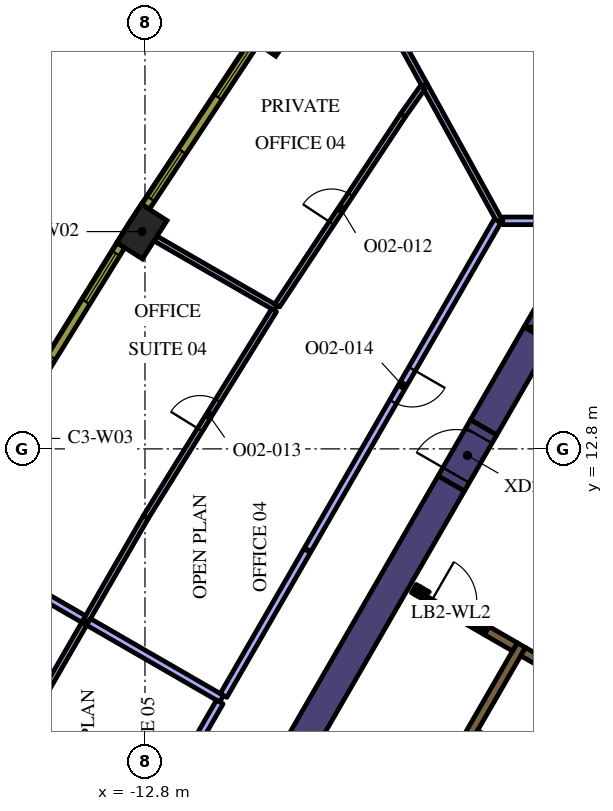
"""IFC4 building model, lengths in metres.
Left out: names, types, materials, properties, quantities, classifications, styles, units other than length and angle.
Written with IfcOpenShell. Run it as: python <this file> out.ifc"""

import sys

from ifc_helpers import new_model, si_unit, direction, frame, frame_2d, origin, origin_2d, place, context, subcontext, project, spatial, polyline, rectangle, outline, extrude, element, fill, save


model = new_model("IFC4")
c1 = context("Model", 3, precision=1e-05, world=origin(), true_north=direction((0.0, 1.0)))
c2 = subcontext(c1, "Body", "Model", "MODEL_VIEW")
j1 = project(units=[si_unit("LENGTHUNIT", "METRE"), si_unit("PLANEANGLEUNIT", "RADIAN")], contexts=[c1])
p1 = place(None, origin())
s1 = spatial("IfcSite", under=j1, at=p1, CompositionType="ELEMENT")
p2 = place(p1, origin())
s2 = spatial("IfcBuilding", under=s1, at=p2, CompositionType="ELEMENT")
p3 = place(p2, frame((0.0, 0.0, 158.4)))
s3 = spatial("IfcBuildingStorey", under=s2, at=p3, CompositionType="ELEMENT", Elevation=158.4)
for number, where, z_axis, x_axis in (
    (1, (-9.348, 23.854, 0.0), (0.0, 0.0, 1.0), (-0.565, -0.825, 0.0)),
    (2, (-12.88, 18.517, 0.0), (0.0, 0.0, 1.0), (-0.539, -0.842, 0.0)),
):
    element("IfcColumn", number, at=place(p3, frame(where, z_axis=z_axis, x_axis=x_axis)), inside=s3, PredefinedType="COLUMN", context=c2, shape_type="SweptSolid", body=[
        extrude(rectangle(XDim=1.2, YDim=0.8, at=origin_2d()), origin(), (0.0, 0.0, 1.0), 4.2),
    ])
p4 = place(p3, origin())
e3 = element("IfcWall", 3, at=p4, inside=s3, PredefinedType="SOLIDWALL", context=c2, shape_type="SweptSolid", body=[
    extrude(outline(polyline([(-2.829, 16.0), (-2.381, 16.776), (-2.381, 16.0), (-2.829, 16.0)])), origin(), (0.0, 0.0, 1.0), 4.2),
])
p5 = place(p3, frame((-2.477, 15.81, 0.0), z_axis=(0.0, 0.0, 1.0), x_axis=(-0.499969377405, -0.866043083026, 0.0)))
e4 = element("IfcWall", 4, at=p5, inside=s3, PredefinedType="SOLIDWALL", context=c2, shape_type="SweptSolid", body=[
    extrude(rectangle(XDim=2.824, YDim=0.8, at=frame_2d((1.412, 0.0))), origin(), (0.0, 0.0, 1.0), 4.2),
])
e5 = element("IfcWall", 5, at=p4, inside=s3, PredefinedType="SOLIDWALL", context=c2, shape_type="SweptSolid", body=[
    extrude(outline(polyline([(-1.905, 16.0), (-2.129, 15.612), (-2.801, 16.0), (-1.905, 16.0)])), origin(), (0.0, 0.0, 1.0), 4.2),
])
p6 = place(p3, frame((-12.668, -1.842, 0.0), z_axis=(0.0, 0.0, 1.0), x_axis=(0.500003640647, 0.866023301845, 0.0)))
e6 = element("IfcWall", 6, at=p6, inside=s3, PredefinedType="SOLIDWALL", context=c2, shape_type="SweptSolid", body=[
    extrude(rectangle(XDim=15.858, YDim=0.8, at=frame_2d((7.929, 0.0))), origin(), (0.0, 0.0, 1.0), 4.2),
])
p7 = place(p3, frame((-8.06, -1.311, 0.0), z_axis=(0.0, 0.0, 1.0), x_axis=(0.50000273126, 0.866023826885, 0.0)))
e7 = element("IfcWall", 7, at=p7, inside=s3, PredefinedType="SOLIDWALL", context=c2, shape_type="SweptSolid", body=[
    extrude(rectangle(XDim=10.33, YDim=0.25, at=frame_2d((5.165, 0.0))), origin(), (0.0, 0.0, 1.0), 4.2),
])
p8 = place(p3, frame((-1.76, 6.836, 0.0), z_axis=(0.0, 0.0, 1.0), x_axis=(-0.865952863304, 0.500125622755, 0.0)))
e8 = element("IfcWall", 8, at=p8, inside=s3, PredefinedType="SOLIDWALL", context=c2, shape_type="SweptSolid", body=[
    extrude(rectangle(XDim=1.258, YDim=0.25, at=frame_2d((0.629, 0.0))), origin(), (0.0, 0.0, 1.0), 4.2),
])
p9 = place(p3, frame((-2.204, 4.182, 0.0), z_axis=(0.0, 0.0, 1.0), x_axis=(-0.866008176907, 0.50002983664, 0.0)))
e9 = element("IfcWall", 9, at=p9, inside=s3, PredefinedType="SOLIDWALL", context=c2, shape_type="SweptSolid", body=[
    extrude(rectangle(XDim=2.2, YDim=0.25, at=frame_2d((1.1, 0.0))), origin(), (0.0, 0.0, 1.0), 4.2),
])
p10 = place(p3, frame((-5.725, 9.125, 0.0), z_axis=(0.0, 0.0, 1.0), x_axis=(0.866185586049, -0.49972245349, 0.0)))
e10 = element("IfcWall", 10, at=p10, inside=s3, PredefinedType="SOLIDWALL", context=c2, shape_type="SweptSolid", body=[
    extrude(rectangle(XDim=0.11, YDim=0.25, at=frame_2d((0.055, 0.0))), origin(), (0.0, 0.0, 1.0), 4.2),
])
p11 = place(p3, frame((-3.066, 7.59, 0.0), z_axis=(0.0, 0.0, 1.0), x_axis=(-0.866081358704, 0.49990307071, 0.0)))
e11 = element("IfcWall", 11, at=p11, inside=s3, PredefinedType="SOLIDWALL", context=c2, shape_type="SweptSolid", body=[
    extrude(rectangle(XDim=0.858, YDim=0.25, at=frame_2d((0.429, 0.0))), origin(), (0.0, 0.0, 1.0), 4.2),
])
e12 = element("IfcWall", 12, at=p4, inside=s3, PredefinedType="SOLIDWALL", context=c2, shape_type="SweptSolid", body=[
    extrude(outline(polyline([(-3.748, 8.128), (-3.813, 8.015), (-4.027, 8.139), (-4.017, 8.156), (-4.008, 8.173), (-4.0, 8.192), (-3.995, 8.21), (-3.991, 8.23), (-3.99, 8.25), (-3.99, 8.268), (-3.748, 8.128)])), origin(), (0.0, 0.0, 1.0), 4.2),
])
e13 = element("IfcWall", 13, at=p4, inside=s3, PredefinedType="SOLIDWALL", context=c2, shape_type="SweptSolid", body=[
    extrude(outline(polyline([(-5.689, 8.96), (-5.69, 8.961), (-5.565, 9.177), (-5.319, 9.035), (-5.335, 9.026), (-5.351, 9.015), (-5.366, 9.002), (-5.379, 8.988), (-5.392, 8.972), (-5.402, 8.956), (-5.412, 8.939), (-5.629, 9.064), (-5.629, 9.064), (-5.689, 8.96)])), origin(), (0.0, 0.0, 1.0), 4.2),
])
p12 = place(p3, frame((-0.898, 6.194, 0.0), z_axis=(0.0, 0.0, 1.0), x_axis=(-0.499996202215, -0.866027596426, 0.0)))
e14 = element("IfcWall", 14, at=p12, inside=s3, PredefinedType="SOLIDWALL", context=c2, shape_type="SweptSolid", body=[
    extrude(rectangle(XDim=9.83, YDim=0.25, at=frame_2d((4.915, 0.0))), origin(), (0.0, 0.0, 1.0), 4.2),
])
p13 = place(p12, frame((0.585, 0.0, 0.0)))
e15 = element("IfcOpeningElement", 15, at=p13, cuts=e14, PredefinedType="OPENING", context=c2, shape_type="SweptSolid", body=[
    extrude(rectangle(XDim=1.1, YDim=2.1, at=frame_2d((0.55, 1.05))), frame((0.0, 0.135, 0.0), z_axis=(0.0, -1.0, 0.0), x_axis=(1.0, 0.0, 0.0)), (0.0, 0.0, 1.0), 0.27),
])
p14 = place(p12, frame((3.105, 0.0, 0.0)))
e16 = element("IfcOpeningElement", 16, at=p14, cuts=e14, PredefinedType="OPENING", context=c2, shape_type="SweptSolid", body=[
    extrude(rectangle(XDim=1.1, YDim=2.1, at=frame_2d((0.55, 1.05))), frame((0.0, 0.135, 0.0), z_axis=(0.0, -1.0, 0.0), x_axis=(1.0, 0.0, 0.0)), (0.0, 0.0, 1.0), 0.27),
])
p15 = place(p12, frame((5.625, 0.0, 0.0)))
e17 = element("IfcOpeningElement", 17, at=p15, cuts=e14, PredefinedType="OPENING", context=c2, shape_type="SweptSolid", body=[
    extrude(rectangle(XDim=1.1, YDim=2.1, at=frame_2d((0.55, 1.05))), frame((0.0, 0.135, 0.0), z_axis=(0.0, -1.0, 0.0), x_axis=(1.0, 0.0, 0.0)), (0.0, 0.0, 1.0), 0.27),
])
p16 = place(p12, frame((8.145, 0.0, 0.0)))
e18 = element("IfcOpeningElement", 18, at=p16, cuts=e14, PredefinedType="OPENING", context=c2, shape_type="SweptSolid", body=[
    extrude(rectangle(XDim=1.1, YDim=2.1, at=frame_2d((0.55, 1.05))), frame((0.0, 0.135, 0.0), z_axis=(0.0, -1.0, 0.0), x_axis=(1.0, 0.0, 0.0)), (0.0, 0.0, 1.0), 0.27),
])
p17 = place(p3, frame((-5.659, 9.012, 0.0), z_axis=(0.0, 0.0, 1.0), x_axis=(0.866009402589, -0.500027713859, 0.0)))
e19 = element("IfcWall", 19, at=p17, inside=s3, PredefinedType="PARTITIONING", context=c2, shape_type="SweptSolid", body=[
    extrude(rectangle(XDim=2.1, YDim=0.12, at=frame_2d((1.05, 0.0))), origin(), (0.0, 0.0, 1.0), 3.15),
])
p18 = place(p17, frame((0.45, 0.0, 0.0)))
e20 = element("IfcOpeningElement", 20, at=p18, cuts=e19, PredefinedType="OPENING", context=c2, shape_type="SweptSolid", body=[
    extrude(rectangle(XDim=1.2, YDim=2.1, at=frame_2d((0.6, 1.05))), frame((0.0, 0.07, 0.0), z_axis=(0.0, -1.0, 0.0), x_axis=(1.0, 0.0, 0.0)), (0.0, 0.0, 1.0), 0.14),
])
p19 = place(p3, frame((-4.739, 11.892, 0.0), z_axis=(0.0, 0.0, 1.0), x_axis=(0.500062241894, 0.865989465428, 0.0)))
e21 = element("IfcWall", 21, at=p19, inside=s3, PredefinedType="SOLIDWALL", context=c2, shape_type="SweptSolid", body=[
    extrude(rectangle(XDim=1.7, YDim=0.8, at=frame_2d((0.85, 0.0))), origin(), (0.0, 0.0, 1.0), 4.2),
])
p20 = place(p19, frame((0.25, 0.0, 0.0)))
e22 = element("IfcOpeningElement", 22, at=p20, cuts=e21, PredefinedType="OPENING", context=c2, shape_type="SweptSolid", body=[
    extrude(rectangle(XDim=1.2, YDim=2.1, at=frame_2d((0.6, 1.05))), frame((0.0, 0.41, 0.0), z_axis=(0.0, -1.0, 0.0), x_axis=(1.0, 0.0, 0.0)), (0.0, 0.0, 1.0), 0.82),
])
p21 = place(p3, frame((-5.442, 22.374, 0.0), z_axis=(0.0, 0.0, 1.0), x_axis=(-0.482987550425, 0.875627218703, 0.0)))
e23 = element("IfcWall", 23, at=p21, inside=s3, PredefinedType="PARTITIONING", context=c2, shape_type="SweptSolid", body=[
    extrude(rectangle(XDim=4.672, YDim=0.15, at=frame_2d((2.336, 0.0))), origin(), (0.0, 0.0, 1.0), 3.15),
])
p22 = place(p3, frame((-3.47, 18.8, 0.0), z_axis=(0.0, 0.0, 1.0), x_axis=(-0.482974768035, 0.875634269225, 0.0)))
e24 = element("IfcWall", 24, at=p22, inside=s3, PredefinedType="PARTITIONING", context=c2, shape_type="SweptSolid", body=[
    extrude(rectangle(XDim=4.09, YDim=0.15, at=frame_2d((2.045, 0.0))), origin(), (0.0, 0.0, 1.0), 3.15),
])
p23 = place(p3, frame((-1.23, 18.8, 0.0), z_axis=(0.0, 0.0, 1.0), x_axis=(-1.0, 0.0, 0.0)))
e25 = element("IfcWall", 25, at=p23, inside=s3, PredefinedType="PARTITIONING", context=c2, shape_type="SweptSolid", body=[
    extrude(rectangle(XDim=2.155, YDim=0.2, at=frame_2d((1.077, 0.0))), origin(), (0.0, 0.0, 1.0), 3.15),
])
p24 = place(p3, frame((-9.363, 16.511, 0.0), z_axis=(0.0, 0.0, 1.0), x_axis=(-0.866006134298, 0.500033374244, 0.0)))
e26 = element("IfcWall", 26, at=p24, inside=s3, PredefinedType="PARTITIONING", context=c2, shape_type="SweptSolid", body=[
    extrude(rectangle(XDim=3.648, YDim=0.15, at=frame_2d((1.824, 0.0))), origin(), (0.0, 0.0, 1.0), 3.15),
])
p25 = place(p3, frame((-5.492, 22.31, 0.0), z_axis=(0.0, 0.0, 1.0), x_axis=(-0.576980663571, -0.816757806124, 0.0)))
e27 = element("IfcWall", 27, at=p25, inside=s3, PredefinedType="PARTITIONING", context=c2, shape_type="SweptSolid", body=[
    extrude(rectangle(XDim=0.902, YDim=0.15, at=frame_2d((0.451, 0.0))), origin(), (0.0, 0.0, 1.0), 3.15),
])
p26 = place(p3, frame((-9.322, 16.573, 0.0), z_axis=(0.0, 0.0, 1.0), x_axis=(0.551906048292, 0.833906298009, 0.0)))
e28 = element("IfcWall", 28, at=p26, inside=s3, PredefinedType="PARTITIONING", context=c2, shape_type="SweptSolid", body=[
    extrude(rectangle(XDim=5.995, YDim=0.15, at=frame_2d((2.998, 0.0))), origin(), (0.0, 0.0, 1.0), 3.15),
])
p27 = place(p26, frame((2.595, 0.0, 0.0)))
e29 = element("IfcOpeningElement", 29, at=p27, cuts=e28, PredefinedType="OPENING", context=c2, shape_type="SweptSolid", body=[
    extrude(rectangle(XDim=0.9, YDim=2.1, at=frame_2d((0.45, 1.05))), frame((0.0, 0.085, 0.0), z_axis=(0.0, -1.0, 0.0), x_axis=(1.0, 0.0, 0.0)), (0.0, 0.0, 1.0), 0.17),
])
p28 = place(p3, frame((-12.779, 11.002, 0.0), z_axis=(0.0, 0.0, 1.0), x_axis=(0.527026092571, 0.849849102929, 0.0)))
e30 = element("IfcWall", 30, at=p28, inside=s3, PredefinedType="PARTITIONING", context=c2, shape_type="SweptSolid", body=[
    extrude(rectangle(XDim=6.407, YDim=0.15, at=frame_2d((3.204, 0.0))), origin(), (0.0, 0.0, 1.0), 3.15),
])
p29 = place(p28, frame((2.707, 0.0, 0.0)))
e31 = element("IfcOpeningElement", 31, at=p29, cuts=e30, PredefinedType="OPENING", context=c2, shape_type="SweptSolid", body=[
    extrude(rectangle(XDim=0.9, YDim=2.1, at=frame_2d((0.45, 1.05))), frame((0.0, 0.085, 0.0), z_axis=(0.0, -1.0, 0.0), x_axis=(1.0, 0.0, 0.0)), (0.0, 0.0, 1.0), 0.17),
])
p30 = place(p3, frame((-12.779, 11.002, 0.0), z_axis=(0.0, 0.0, 1.0), x_axis=(-0.499996312652, -0.866027532665, 0.0)))
e32 = element("IfcWall", 32, at=p30, inside=s3, PredefinedType="PARTITIONING", context=c2, shape_type="SweptSolid", body=[
    extrude(rectangle(XDim=3.138, YDim=0.15, at=frame_2d((1.569, 0.0))), origin(), (0.0, 0.0, 1.0), 3.15),
])
p31 = place(p3, frame((-14.413, 8.322, 0.0), z_axis=(0.0, 0.0, 1.0), x_axis=(-0.866034795751, 0.499983732284, 0.0)))
e33 = element("IfcWall", 33, at=p31, inside=s3, PredefinedType="PARTITIONING", context=c2, shape_type="SweptSolid", body=[
    extrude(rectangle(XDim=4.125, YDim=0.2, at=frame_2d((2.062, 0.0))), origin(), (0.0, 0.0, 1.0), 3.15),
])
p32 = place(p3, frame((-10.782, 6.225, 0.0), z_axis=(0.0, 0.0, 1.0), x_axis=(-0.866034752867, 0.499983806564, 0.0)))
e34 = element("IfcWall", 34, at=p32, inside=s3, PredefinedType="PARTITIONING", context=c2, shape_type="SweptSolid", body=[
    extrude(rectangle(XDim=4.043, YDim=0.2, at=frame_2d((2.021, 0.0))), origin(), (0.0, 0.0, 1.0), 3.15),
])
p33 = place(p3, frame((-8.532, 10.122, 0.0), z_axis=(0.0, 0.0, 1.0), x_axis=(-0.499988222896, -0.866032203192, 0.0)))
e35 = element("IfcWall", 35, at=p33, inside=s3, PredefinedType="PARTITIONING", context=c2, shape_type="SweptSolid", body=[
    extrude(rectangle(XDim=4.4, YDim=0.2, at=frame_2d((2.2, 0.0))), origin(), (0.0, 0.0, 1.0), 3.15),
])
p34 = place(p3, frame((-3.522, 18.8, 0.0), z_axis=(0.0, 0.0, 1.0), x_axis=(-0.500015783377, -0.866016291056, 0.0)))
e36 = element("IfcWall", 36, at=p34, inside=s3, PredefinedType="PARTITIONING", context=c2, shape_type="SweptSolid", body=[
    extrude(rectangle(XDim=9.99, YDim=0.2, at=frame_2d((4.995, 0.0))), origin(), (0.0, 0.0, 1.0), 3.15),
])
p35 = place(p34, frame((4.5, 0.0, 0.0)))
e37 = element("IfcOpeningElement", 37, at=p35, cuts=e36, PredefinedType="OPENING", context=c2, shape_type="SweptSolid", body=[
    extrude(rectangle(XDim=1.0, YDim=2.1, at=frame_2d((0.5, 1.05))), frame((0.0, 0.11, 0.0), z_axis=(0.0, -1.0, 0.0), x_axis=(1.0, 0.0, 0.0)), (0.0, 0.0, 1.0), 0.22),
])
p36 = place(p3, frame((-14.398, 8.198, 0.0), z_axis=(0.0, 0.0, 1.0), x_axis=(-0.499993740961, -0.866029017412, 0.0)))
e38 = element("IfcWall", 38, at=p36, inside=s3, PredefinedType="PARTITIONING", context=c2, shape_type="SweptSolid", body=[
    extrude(rectangle(XDim=3.038, YDim=0.15, at=frame_2d((1.519, 0.0))), origin(), (0.0, 0.0, 1.0), 3.15),
])
p37 = place(p3, frame((-10.832, 6.138, 0.0), z_axis=(0.0, 0.0, 1.0), x_axis=(-0.499988222896, -0.866032203192, 0.0)))
e39 = element("IfcWall", 39, at=p37, inside=s3, PredefinedType="PARTITIONING", context=c2, shape_type="SweptSolid", body=[
    extrude(rectangle(XDim=4.4, YDim=0.2, at=frame_2d((2.2, 0.0))), origin(), (0.0, 0.0, 1.0), 3.15),
])
p38 = place(p3, frame((-9.911, 23.51, 0.0), z_axis=(0.0, 0.0, 1.0), x_axis=(-0.551892811511, -0.833915058386, 0.0)))
e40 = element("IfcWall", 40, at=p38, inside=s3, PredefinedType="SOLIDWALL", context=c2, shape_type="SweptSolid", body=[
    extrude(rectangle(XDim=5.204, YDim=0.24, at=frame_2d((2.602, 0.0))), origin(), (0.0, 0.0, 1.0), 3.95),
])
p39 = place(p38, frame((0.248, 0.0, 0.9)))
e41 = element("IfcOpeningElement", 41, at=p39, cuts=e40, PredefinedType="OPENING", context=c2, shape_type="SweptSolid", body=[
    extrude(rectangle(XDim=1.5, YDim=2.55, at=frame_2d((0.75, 1.275))), frame((0.0, 0.13, 0.0), z_axis=(0.0, -1.0, 0.0), x_axis=(1.0, 0.0, 0.0)), (0.0, 0.0, 1.0), 0.26),
])
p40 = place(p38, frame((3.455, 0.0, 0.9)))
e42 = element("IfcOpeningElement", 42, at=p40, cuts=e40, PredefinedType="OPENING", context=c2, shape_type="SweptSolid", body=[
    extrude(rectangle(XDim=1.5, YDim=2.55, at=frame_2d((0.75, 1.275))), frame((0.0, 0.13, 0.0), z_axis=(0.0, -1.0, 0.0), x_axis=(1.0, 0.0, 0.0)), (0.0, 0.0, 1.0), 0.26),
])
p41 = place(p3, frame((-13.433, 18.156, 0.0), z_axis=(0.0, 0.0, 1.0), x_axis=(-0.526197926587, -0.850362124072, 0.0)))
e43 = element("IfcWall", 43, at=p41, inside=s3, PredefinedType="SOLIDWALL", context=c2, shape_type="SweptSolid", body=[
    extrude(rectangle(XDim=5.203, YDim=0.24, at=frame_2d((2.602, 0.0))), origin(), (0.0, 0.0, 1.0), 3.95),
])
p42 = place(p41, frame((0.248, 0.0, 0.9)))
e44 = element("IfcOpeningElement", 44, at=p42, cuts=e43, PredefinedType="OPENING", context=c2, shape_type="SweptSolid", body=[
    extrude(rectangle(XDim=1.5, YDim=2.55, at=frame_2d((0.75, 1.275))), frame((0.0, 0.13, 0.0), z_axis=(0.0, -1.0, 0.0), x_axis=(1.0, 0.0, 0.0)), (0.0, 0.0, 1.0), 0.26),
])
p43 = place(p41, frame((3.455, 0.0, 0.9)))
e45 = element("IfcOpeningElement", 45, at=p43, cuts=e43, PredefinedType="OPENING", context=c2, shape_type="SweptSolid", body=[
    extrude(rectangle(XDim=1.5, YDim=2.55, at=frame_2d((0.75, 1.275))), frame((0.0, 0.13, 0.0), z_axis=(0.0, -1.0, 0.0), x_axis=(1.0, 0.0, 0.0)), (0.0, 0.0, 1.0), 0.26),
])
p44 = place(p18, origin())
e46 = element("IfcDoor", 46, at=p44, inside=s3, OperationType="SINGLE_SWING_LEFT", PredefinedType="DOOR", context=c2, shape_type="SweptSolid", body=[
    extrude(rectangle(XDim=1.2, YDim=2.1, at=frame_2d((0.6, 1.05))), frame((0.0, 0.025, 0.0), z_axis=(0.0, -1.0, 0.0), x_axis=(1.0, 0.0, 0.0)), (0.0, 0.0, 1.0), 0.05),
])
fill(e20, e46)
p45 = place(p20, origin())
e47 = element("IfcDoor", 47, at=p45, inside=s3, OperationType="SINGLE_SWING_LEFT", PredefinedType="DOOR", context=c2, shape_type="SweptSolid", body=[
    extrude(rectangle(XDim=1.2, YDim=2.1, at=frame_2d((0.6, 1.05))), frame((0.0, 0.025, 0.0), z_axis=(0.0, -1.0, 0.0), x_axis=(1.0, 0.0, 0.0)), (0.0, 0.0, 1.0), 0.05),
])
fill(e22, e47)
p46 = place(p27, origin())
e48 = element("IfcDoor", 48, at=p46, inside=s3, OperationType="SINGLE_SWING_RIGHT", PredefinedType="DOOR", context=c2, shape_type="SweptSolid", body=[
    extrude(rectangle(XDim=0.9, YDim=2.1, at=frame_2d((0.45, 1.05))), frame((0.0, 0.025, 0.0), z_axis=(0.0, -1.0, 0.0), x_axis=(1.0, 0.0, 0.0)), (0.0, 0.0, 1.0), 0.05),
])
fill(e29, e48)
p47 = place(p29, origin())
e49 = element("IfcDoor", 49, at=p47, inside=s3, OperationType="SINGLE_SWING_LEFT", PredefinedType="DOOR", context=c2, shape_type="SweptSolid", body=[
    extrude(rectangle(XDim=0.9, YDim=2.1, at=frame_2d((0.45, 1.05))), frame((0.0, 0.025, 0.0), z_axis=(0.0, -1.0, 0.0), x_axis=(1.0, 0.0, 0.0)), (0.0, 0.0, 1.0), 0.05),
])
fill(e31, e49)
p48 = place(p35, origin())
e50 = element("IfcDoor", 50, at=p48, inside=s3, OperationType="SINGLE_SWING_RIGHT", PredefinedType="DOOR", context=c2, shape_type="SweptSolid", body=[
    extrude(rectangle(XDim=1.0, YDim=2.1, at=frame_2d((0.5, 1.05))), frame((0.0, 0.025, 0.0), z_axis=(0.0, -1.0, 0.0), x_axis=(1.0, 0.0, 0.0)), (0.0, 0.0, 1.0), 0.05),
])
fill(e37, e50)
p49 = place(p39, origin())
e51 = element("IfcWindow", 51, at=p49, inside=s3, PartitioningType="SINGLE_PANEL", PredefinedType="WINDOW", context=c2, shape_type="SweptSolid", body=[
    extrude(rectangle(XDim=1.5, YDim=2.55, at=frame_2d((0.75, 1.275))), frame((0.0, 0.04, 0.0), z_axis=(0.0, -1.0, 0.0), x_axis=(1.0, 0.0, 0.0)), (0.0, 0.0, 1.0), 0.06),
])
fill(e41, e51)
p50 = place(p40, origin())
e52 = element("IfcWindow", 52, at=p50, inside=s3, PartitioningType="SINGLE_PANEL", PredefinedType="WINDOW", context=c2, shape_type="SweptSolid", body=[
    extrude(rectangle(XDim=1.5, YDim=2.55, at=frame_2d((0.75, 1.275))), frame((0.0, 0.04, 0.0), z_axis=(0.0, -1.0, 0.0), x_axis=(1.0, 0.0, 0.0)), (0.0, 0.0, 1.0), 0.06),
])
fill(e42, e52)
p51 = place(p42, origin())
e53 = element("IfcWindow", 53, at=p51, inside=s3, PartitioningType="SINGLE_PANEL", PredefinedType="WINDOW", context=c2, shape_type="SweptSolid", body=[
    extrude(rectangle(XDim=1.5, YDim=2.55, at=frame_2d((0.75, 1.275))), frame((0.0, 0.04, 0.0), z_axis=(0.0, -1.0, 0.0), x_axis=(1.0, 0.0, 0.0)), (0.0, 0.0, 1.0), 0.06),
])
fill(e44, e53)
p52 = place(p43, origin())
e54 = element("IfcWindow", 54, at=p52, inside=s3, PartitioningType="SINGLE_PANEL", PredefinedType="WINDOW", context=c2, shape_type="SweptSolid", body=[
    extrude(rectangle(XDim=1.5, YDim=2.55, at=frame_2d((0.75, 1.275))), frame((0.0, 0.04, 0.0), z_axis=(0.0, -1.0, 0.0), x_axis=(1.0, 0.0, 0.0)), (0.0, 0.0, 1.0), 0.06),
])
fill(e45, e54)
save(model, sys.argv[1])
